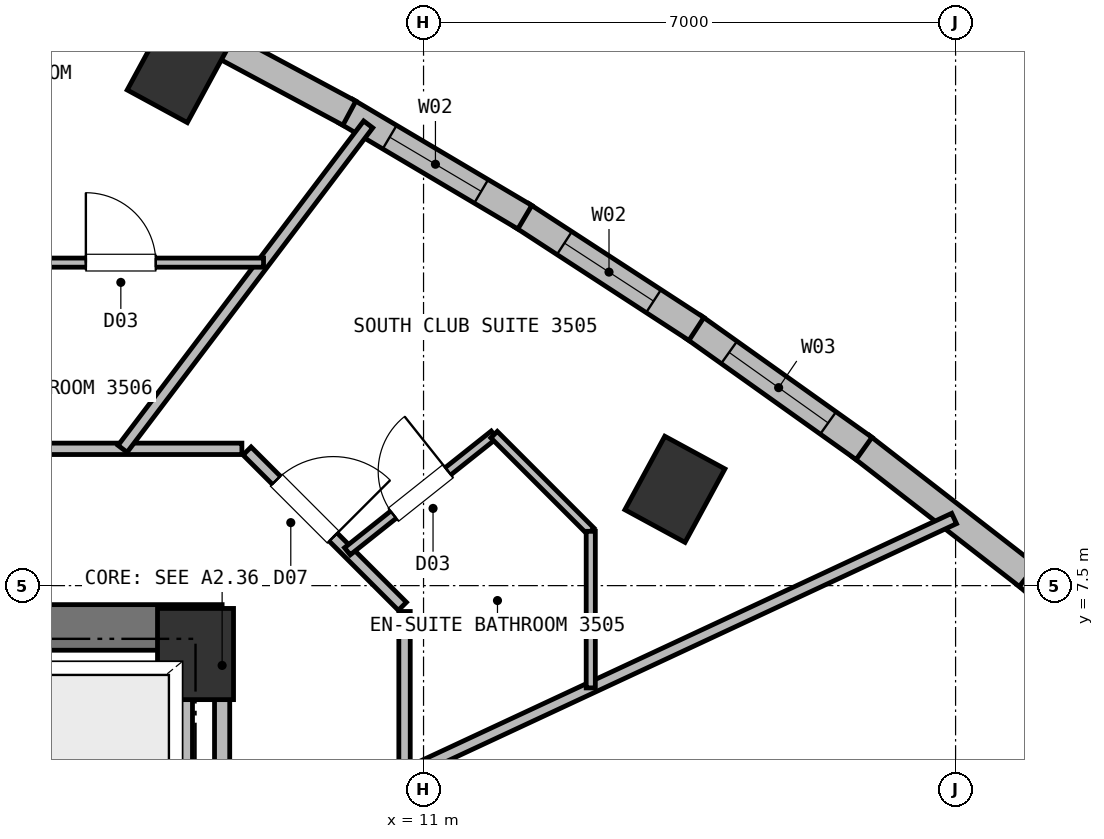
"""IFC4 building model, lengths in metres.
Left out: names, types, materials, properties, quantities, classifications, styles, units other than length and angle.
Written with IfcOpenShell. Run it as: python <this file> out.ifc"""

import sys

from ifc_helpers import new_model, si_unit, direction, frame, frame_2d, origin, origin_2d, place, context, subcontext, project, spatial, rectangle, extrude, element, fill, save


model = new_model("IFC4")
c1 = context("Model", 3, precision=1e-05, world=origin(), true_north=direction((0.0, 1.0)))
c2 = subcontext(c1, "Body", "Model", "MODEL_VIEW")
j1 = project(units=[si_unit("LENGTHUNIT", "METRE"), si_unit("PLANEANGLEUNIT", "RADIAN")], contexts=[c1])
p1 = place(None, origin())
s1 = spatial("IfcSite", under=j1, at=p1, CompositionType="ELEMENT")
p2 = place(p1, origin())
s2 = spatial("IfcBuilding", under=s1, at=p2, CompositionType="ELEMENT")
p3 = place(p2, frame((0.0, 0.0, 131.0)))
s3 = spatial("IfcBuildingStorey", under=s2, at=p3, CompositionType="ELEMENT", Elevation=131.0)
p4 = place(p3, frame((8.0, 6.6, 0.0), z_axis=(0.0, 0.0, 1.0), x_axis=(1.0, 0.0, 0.0)))
e1 = element("IfcColumn", 1, at=p4, inside=s3, PredefinedType="COLUMN", context=c2, shape_type="SweptSolid", body=[
    extrude(rectangle(XDim=1.0, YDim=1.2, at=origin_2d()), origin(), (0.0, 0.0, 1.0), 3.75),
])
p5 = place(p3, frame((-8.35, 6.95, 0.0), z_axis=(0.0, 0.0, 1.0), x_axis=(1.0, 0.0, 0.0)))
e2 = element("IfcWall", 2, at=p5, inside=s3, PredefinedType="SHEAR", context=c2, shape_type="SweptSolid", body=[
    extrude(rectangle(XDim=16.7, YDim=0.6, at=frame_2d((8.35, 0.0))), origin(), (0.0, 0.0, 1.0), 3.5),
])
for number, where, z_axis, x_axis in (
    (3, (14.307, 8.767, 0.0), (0.0, 0.0, 1.0), (-0.879, 0.477, 0.0)),
    (4, (7.759, 14.29, 0.0), (0.0, 0.0, 1.0), (-0.879, 0.477, 0.0)),
):
    element("IfcColumn", number, at=place(p3, frame(where, z_axis=z_axis, x_axis=x_axis)), inside=s3, PredefinedType="COLUMN", context=c2, shape_type="SweptSolid", body=[
        extrude(rectangle(XDim=0.9, YDim=1.1, at=origin_2d()), origin(), (0.0, 0.0, 1.0), 3.75),
    ])
p6 = place(p3, frame((18.91, 7.662, 0.0), z_axis=(0.0, 0.0, 1.0), x_axis=(0.764205561234, -0.644972759253, 0.0)))
e5 = element("IfcWall", 5, at=p6, inside=s3, PredefinedType="SOLIDWALL", context=c2, shape_type="SweptSolid", body=[
    extrude(rectangle(XDim=2.801, YDim=0.36, at=frame_2d((1.4, 0.0))), origin(), (0.0, 0.0, 1.0), 3.5),
])
p7 = place(p6, frame((0.601, 0.0, 0.72)))
e6 = element("IfcOpeningElement", 6, at=p7, cuts=e5, PredefinedType="OPENING", context=c2, shape_type="SweptSolid", body=[
    extrude(rectangle(XDim=1.6, YDim=1.88, at=frame_2d((0.8, 0.94))), frame((0.0, 0.19, 0.0), z_axis=(0.0, -1.0, 0.0), x_axis=(1.0, 0.0, 0.0)), (0.0, 0.0, 1.0), 0.38),
])
p8 = place(p3, frame((16.755, 9.334, 0.0), z_axis=(0.0, 0.0, 1.0), x_axis=(0.789792196605, -0.61337450728, 0.0)))
e7 = element("IfcWall", 7, at=p8, inside=s3, PredefinedType="SOLIDWALL", context=c2, shape_type="SweptSolid", body=[
    extrude(rectangle(XDim=2.777, YDim=0.36, at=frame_2d((1.389, 0.0))), origin(), (0.0, 0.0, 1.0), 3.5),
])
p9 = place(p3, frame((14.549, 10.905, 0.0), z_axis=(0.0, 0.0, 1.0), x_axis=(0.814510150839, -0.580149303352, 0.0)))
e8 = element("IfcWall", 8, at=p9, inside=s3, PredefinedType="SOLIDWALL", context=c2, shape_type="SweptSolid", body=[
    extrude(rectangle(XDim=2.759, YDim=0.36, at=frame_2d((1.379, 0.0))), origin(), (0.0, 0.0, 1.0), 3.5),
])
p10 = place(p9, frame((0.579, 0.0, 0.72)))
e9 = element("IfcOpeningElement", 9, at=p10, cuts=e8, PredefinedType="OPENING", context=c2, shape_type="SweptSolid", body=[
    extrude(rectangle(XDim=1.6, YDim=1.88, at=frame_2d((0.8, 0.94))), frame((0.0, 0.19, 0.0), z_axis=(0.0, -1.0, 0.0), x_axis=(1.0, 0.0, 0.0)), (0.0, 0.0, 1.0), 0.38),
])
p11 = place(p3, frame((12.29, 12.374, 0.0), z_axis=(0.0, 0.0, 1.0), x_axis=(0.838077548848, -0.545551117785, 0.0)))
e10 = element("IfcWall", 10, at=p11, inside=s3, PredefinedType="SOLIDWALL", context=c2, shape_type="SweptSolid", body=[
    extrude(rectangle(XDim=2.744, YDim=0.36, at=frame_2d((1.372, 0.0))), origin(), (0.0, 0.0, 1.0), 3.5),
])
p12 = place(p11, frame((0.672, 0.0, 0.72)))
e11 = element("IfcOpeningElement", 11, at=p12, cuts=e10, PredefinedType="OPENING", context=c2, shape_type="SweptSolid", body=[
    extrude(rectangle(XDim=1.4, YDim=1.84, at=frame_2d((0.7, 0.92))), frame((0.0, 0.19, 0.0), z_axis=(0.0, -1.0, 0.0), x_axis=(1.0, 0.0, 0.0)), (0.0, 0.0, 1.0), 0.38),
])
p13 = place(p3, frame((9.98, 13.741, 0.0), z_axis=(0.0, 0.0, 1.0), x_axis=(0.860339389624, -0.509721624675, 0.0)))
e12 = element("IfcWall", 12, at=p13, inside=s3, PredefinedType="SOLIDWALL", context=c2, shape_type="SweptSolid", body=[
    extrude(rectangle(XDim=2.734, YDim=0.36, at=frame_2d((1.367, 0.0))), origin(), (0.0, 0.0, 1.0), 3.5),
])
p14 = place(p13, frame((0.667, 0.0, 0.72)))
e13 = element("IfcOpeningElement", 13, at=p14, cuts=e12, PredefinedType="OPENING", context=c2, shape_type="SweptSolid", body=[
    extrude(rectangle(XDim=1.4, YDim=1.84, at=frame_2d((0.7, 0.92))), frame((0.0, 0.19, 0.0), z_axis=(0.0, -1.0, 0.0), x_axis=(1.0, 0.0, 0.0)), (0.0, 0.0, 1.0), 0.38),
])
p15 = place(p3, frame((7.619, 15.008, 0.0), z_axis=(0.0, 0.0, 1.0), x_axis=(0.881156632258, -0.472824480572, 0.0)))
e14 = element("IfcWall", 14, at=p15, inside=s3, PredefinedType="SOLIDWALL", context=c2, shape_type="SweptSolid", body=[
    extrude(rectangle(XDim=2.729, YDim=0.36, at=frame_2d((1.365, 0.0))), origin(), (0.0, 0.0, 1.0), 3.5),
])
p16 = place(p3, frame((7.85, 4.57, 0.0), z_axis=(0.0, 0.0, 1.0), x_axis=(0.0, 1.0, 0.0)))
e15 = element("IfcWall", 15, at=p16, inside=s3, PredefinedType="PARTITIONING", context=c2, shape_type="SweptSolid", body=[
    extrude(rectangle(XDim=2.08, YDim=0.22, at=frame_2d((1.04, 0.0))), origin(), (0.0, 0.0, 1.0), 3.12),
])
p17 = place(p3, frame((8.35, 1.25, 0.0), z_axis=(0.0, 0.0, 1.0), x_axis=(0.0, 1.0, 0.0)))
e16 = element("IfcWall", 16, at=p17, inside=s3, PredefinedType="PARTITIONING", context=c2, shape_type="SweptSolid", body=[
    extrude(rectangle(XDim=5.3, YDim=0.2, at=frame_2d((2.65, 0.0))), origin(), (0.0, 0.0, 1.0), 3.5),
])
p18 = place(p17, frame((0.95, 0.0, 0.0)))
e17 = element("IfcOpeningElement", 17, at=p18, cuts=e16, PredefinedType="OPENING", context=c2, shape_type="SweptSolid", body=[
    extrude(rectangle(XDim=1.15, YDim=2.15, at=frame_2d((0.575, 1.075))), frame((0.0, 0.11, 0.0), z_axis=(0.0, -1.0, 0.0), x_axis=(1.0, 0.0, 0.0)), (0.0, 0.0, 1.0), 0.22),
])
p19 = place(p3, frame((10.75, 7.16, 0.0), z_axis=(0.0, 0.0, 1.0), x_axis=(0.0, -1.0, 0.0)))
e18 = element("IfcWall", 18, at=p19, inside=s3, PredefinedType="PARTITIONING", context=c2, shape_type="SweptSolid", body=[
    extrude(rectangle(XDim=12.92, YDim=0.15, at=frame_2d((6.46, 0.0))), origin(), (0.0, 0.0, 1.0), 3.5),
])
p20 = place(p19, frame((8.359, 0.0, 0.0)))
e19 = element("IfcOpeningElement", 19, at=p20, cuts=e18, PredefinedType="OPENING", context=c2, shape_type="SweptSolid", body=[
    extrude(rectangle(XDim=1.06, YDim=2.15, at=frame_2d((0.53, 1.075))), frame((0.0, 0.085, 0.0), z_axis=(0.0, -1.0, 0.0), x_axis=(1.0, 0.0, 0.0)), (0.0, 0.0, 1.0), 0.17),
])
p21 = place(p19, frame((3.132, 0.0, 0.0)))
e20 = element("IfcOpeningElement", 20, at=p21, cuts=e18, PredefinedType="OPENING", context=c2, shape_type="SweptSolid", body=[
    extrude(rectangle(XDim=1.06, YDim=2.15, at=frame_2d((0.53, 1.075))), frame((0.0, 0.085, 0.0), z_axis=(0.0, -1.0, 0.0), x_axis=(1.0, 0.0, 0.0)), (0.0, 0.0, 1.0), 0.17),
])
p22 = place(p3, frame((8.678, 9.272, 0.0), z_axis=(0.0, 0.0, 1.0), x_axis=(0.707106781187, -0.707106781187, 0.0)))
e21 = element("IfcWall", 21, at=p22, inside=s3, PredefinedType="PARTITIONING", context=c2, shape_type="SweptSolid", body=[
    extrude(rectangle(XDim=2.89, YDim=0.15, at=frame_2d((1.445, 0.0))), origin(), (0.0, 0.0, 1.0), 3.5),
])
p23 = place(p22, frame((0.543, 0.0, 0.0)))
e22 = element("IfcOpeningElement", 22, at=p23, cuts=e21, PredefinedType="OPENING", context=c2, shape_type="SweptSolid", body=[
    extrude(rectangle(XDim=1.06, YDim=2.15, at=frame_2d((0.53, 1.075))), frame((0.0, 0.085, 0.0), z_axis=(0.0, -1.0, 0.0), x_axis=(1.0, 0.0, 0.0)), (0.0, 0.0, 1.0), 0.17),
])
p24 = place(p3, frame((-8.61, 9.3, 0.0), z_axis=(0.0, 0.0, 1.0), x_axis=(1.0, 0.0, 0.0)))
e23 = element("IfcWall", 23, at=p24, inside=s3, PredefinedType="PARTITIONING", context=c2, shape_type="SweptSolid", body=[
    extrude(rectangle(XDim=17.22, YDim=0.15, at=frame_2d((8.61, 0.0))), origin(), (0.0, 0.0, 1.0), 3.5),
])
p25 = place(p24, frame((11.156, 0.0, 0.0)))
e24 = element("IfcOpeningElement", 24, at=p25, cuts=e23, PredefinedType="OPENING", context=c2, shape_type="SweptSolid", body=[
    extrude(rectangle(XDim=1.0, YDim=2.15, at=frame_2d((0.5, 1.075))), frame((0.0, 0.085, 0.0), z_axis=(0.0, -1.0, 0.0), x_axis=(1.0, 0.0, 0.0)), (0.0, 0.0, 1.0), 0.17),
])
p26 = place(p24, frame((6.799, 0.0, 0.0)))
e25 = element("IfcOpeningElement", 25, at=p26, cuts=e23, PredefinedType="OPENING", context=c2, shape_type="SweptSolid", body=[
    extrude(rectangle(XDim=1.06, YDim=2.15, at=frame_2d((0.53, 1.075))), frame((0.0, 0.085, 0.0), z_axis=(0.0, -1.0, 0.0), x_axis=(1.0, 0.0, 0.0)), (0.0, 0.0, 1.0), 0.17),
])
p27 = place(p24, frame((1.737, 0.0, 0.0)))
e26 = element("IfcOpeningElement", 26, at=p27, cuts=e23, PredefinedType="OPENING", context=c2, shape_type="SweptSolid", body=[
    extrude(rectangle(XDim=1.06, YDim=2.15, at=frame_2d((0.53, 1.075))), frame((0.0, 0.085, 0.0), z_axis=(0.0, -1.0, 0.0), x_axis=(1.0, 0.0, 0.0)), (0.0, 0.0, 1.0), 0.17),
])
p28 = place(p24, frame((8.48, 0.0, 0.0)))
e27 = element("IfcOpeningElement", 27, at=p28, cuts=e23, PredefinedType="OPENING", context=c2, shape_type="SweptSolid", body=[
    extrude(rectangle(XDim=1.0, YDim=2.15, at=frame_2d((0.5, 1.075))), frame((0.0, 0.085, 0.0), z_axis=(0.0, -1.0, 0.0), x_axis=(1.0, 0.0, 0.0)), (0.0, 0.0, 1.0), 0.17),
])
p29 = place(p3, frame((10.75, 5.012, 0.0), z_axis=(0.0, 0.0, 1.0), x_axis=(0.90633944919, 0.422550355393, 0.0)))
e28 = element("IfcWall", 28, at=p29, inside=s3, PredefinedType="PARTITIONING", context=c2, shape_type="SweptSolid", body=[
    extrude(rectangle(XDim=7.977, YDim=0.15, at=frame_2d((3.989, 0.0))), origin(), (0.0, 0.0, 1.0), 3.5),
])
p30 = place(p3, frame((9.998, 7.952, 0.0), z_axis=(0.0, 0.0, 1.0), x_axis=(0.782652575374, 0.622458790813, 0.0)))
e29 = element("IfcWall", 29, at=p30, inside=s3, PredefinedType="PARTITIONING", context=c2, shape_type="SweptSolid", body=[
    extrude(rectangle(XDim=2.466, YDim=0.12, at=frame_2d((1.233, 0.0))), origin(), (0.0, 0.0, 1.0), 3.5),
])
p31 = place(p30, frame((0.773, 0.0, 0.0)))
e30 = element("IfcOpeningElement", 30, at=p31, cuts=e29, PredefinedType="OPENING", context=c2, shape_type="SweptSolid", body=[
    extrude(rectangle(XDim=0.92, YDim=2.1, at=frame_2d((0.46, 1.05))), frame((0.0, 0.07, 0.0), z_axis=(0.0, -1.0, 0.0), x_axis=(1.0, 0.0, 0.0)), (0.0, 0.0, 1.0), 0.14),
])
p32 = place(p3, frame((11.928, 9.487, 0.0), z_axis=(0.0, 0.0, 1.0), x_axis=(0.707106781187, -0.707106781187, 0.0)))
e31 = element("IfcWall", 31, at=p32, inside=s3, PredefinedType="PARTITIONING", context=c2, shape_type="SweptSolid", body=[
    extrude(rectangle(XDim=1.799, YDim=0.12, at=frame_2d((0.899, 0.0))), origin(), (0.0, 0.0, 1.0), 3.5),
])
p33 = place(p3, frame((13.2, 6.154, 0.0), z_axis=(0.0, 0.0, 1.0), x_axis=(0.0, 1.0, 0.0)))
e32 = element("IfcWall", 32, at=p33, inside=s3, PredefinedType="PARTITIONING", context=c2, shape_type="SweptSolid", body=[
    extrude(rectangle(XDim=2.061, YDim=0.12, at=frame_2d((1.03, 0.0))), origin(), (0.0, 0.0, 1.0), 3.5),
])
p34 = place(p3, frame((7.04, 9.3, 0.0), z_axis=(0.0, 0.0, 1.0), x_axis=(0.603561778398, 0.797316235667, 0.0)))
e33 = element("IfcWall", 33, at=p34, inside=s3, PredefinedType="PARTITIONING", context=c2, shape_type="SweptSolid", body=[
    extrude(rectangle(XDim=5.354, YDim=0.15, at=frame_2d((2.677, 0.0))), origin(), (0.0, 0.0, 1.0), 3.5),
])
p35 = place(p3, frame((5.14, 11.75, 0.0), z_axis=(0.0, 0.0, 1.0), x_axis=(1.0, 0.0, 0.0)))
e34 = element("IfcWall", 34, at=p35, inside=s3, PredefinedType="PARTITIONING", context=c2, shape_type="SweptSolid", body=[
    extrude(rectangle(XDim=3.755, YDim=0.12, at=frame_2d((1.877, 0.0))), origin(), (0.0, 0.0, 1.0), 3.5),
])
p36 = place(p35, frame((1.417, 0.0, 0.0)))
e35 = element("IfcOpeningElement", 35, at=p36, cuts=e34, PredefinedType="OPENING", context=c2, shape_type="SweptSolid", body=[
    extrude(rectangle(XDim=0.92, YDim=2.1, at=frame_2d((0.46, 1.05))), frame((0.0, 0.07, 0.0), z_axis=(0.0, -1.0, 0.0), x_axis=(1.0, 0.0, 0.0)), (0.0, 0.0, 1.0), 0.14),
])
p37 = place(p10, origin())
e36 = element("IfcWindow", 36, at=p37, inside=s3, PartitioningType="SINGLE_PANEL", PredefinedType="WINDOW", context=c2, shape_type="SweptSolid", body=[
    extrude(rectangle(XDim=1.6, YDim=1.88, at=frame_2d((0.8, 0.94))), frame((0.0, 0.03, 0.0), z_axis=(0.0, -1.0, 0.0), x_axis=(1.0, 0.0, 0.0)), (0.0, 0.0, 1.0), 0.06),
])
fill(e9, e36)
p38 = place(p12, origin())
e37 = element("IfcWindow", 37, at=p38, inside=s3, PartitioningType="SINGLE_PANEL", PredefinedType="WINDOW", context=c2, shape_type="SweptSolid", body=[
    extrude(rectangle(XDim=1.4, YDim=1.84, at=frame_2d((0.7, 0.92))), frame((0.0, 0.03, 0.0), z_axis=(0.0, -1.0, 0.0), x_axis=(1.0, 0.0, 0.0)), (0.0, 0.0, 1.0), 0.06),
])
fill(e11, e37)
p39 = place(p14, origin())
e38 = element("IfcWindow", 38, at=p39, inside=s3, PartitioningType="SINGLE_PANEL", PredefinedType="WINDOW", context=c2, shape_type="SweptSolid", body=[
    extrude(rectangle(XDim=1.4, YDim=1.84, at=frame_2d((0.7, 0.92))), frame((0.0, 0.03, 0.0), z_axis=(0.0, -1.0, 0.0), x_axis=(1.0, 0.0, 0.0)), (0.0, 0.0, 1.0), 0.06),
])
fill(e13, e38)
p40 = place(p31, origin())
e39 = element("IfcDoor", 39, at=p40, inside=s3, OperationType="SINGLE_SWING_RIGHT", PredefinedType="DOOR", context=c2, shape_type="SweptSolid", body=[
    extrude(rectangle(XDim=0.92, YDim=2.1, at=frame_2d((0.46, 1.05))), frame((0.0, 0.025, 0.0), z_axis=(0.0, -1.0, 0.0), x_axis=(1.0, 0.0, 0.0)), (0.0, 0.0, 1.0), 0.05),
])
fill(e30, e39)
p41 = place(p36, origin())
e40 = element("IfcDoor", 40, at=p41, inside=s3, OperationType="SINGLE_SWING_LEFT", PredefinedType="DOOR", context=c2, shape_type="SweptSolid", body=[
    extrude(rectangle(XDim=0.92, YDim=2.1, at=frame_2d((0.46, 1.05))), frame((0.0, 0.025, 0.0), z_axis=(0.0, -1.0, 0.0), x_axis=(1.0, 0.0, 0.0)), (0.0, 0.0, 1.0), 0.05),
])
fill(e35, e40)
p42 = place(p23, origin())
e41 = element("IfcDoor", 41, at=p42, inside=s3, OperationType="SINGLE_SWING_RIGHT", PredefinedType="DOOR", context=c2, shape_type="SweptSolid", body=[
    extrude(rectangle(XDim=1.06, YDim=2.15, at=frame_2d((0.53, 1.075))), frame((0.0, 0.025, 0.0), z_axis=(0.0, -1.0, 0.0), x_axis=(1.0, 0.0, 0.0)), (0.0, 0.0, 1.0), 0.05),
])
fill(e22, e41)
save(model, sys.argv[1])
